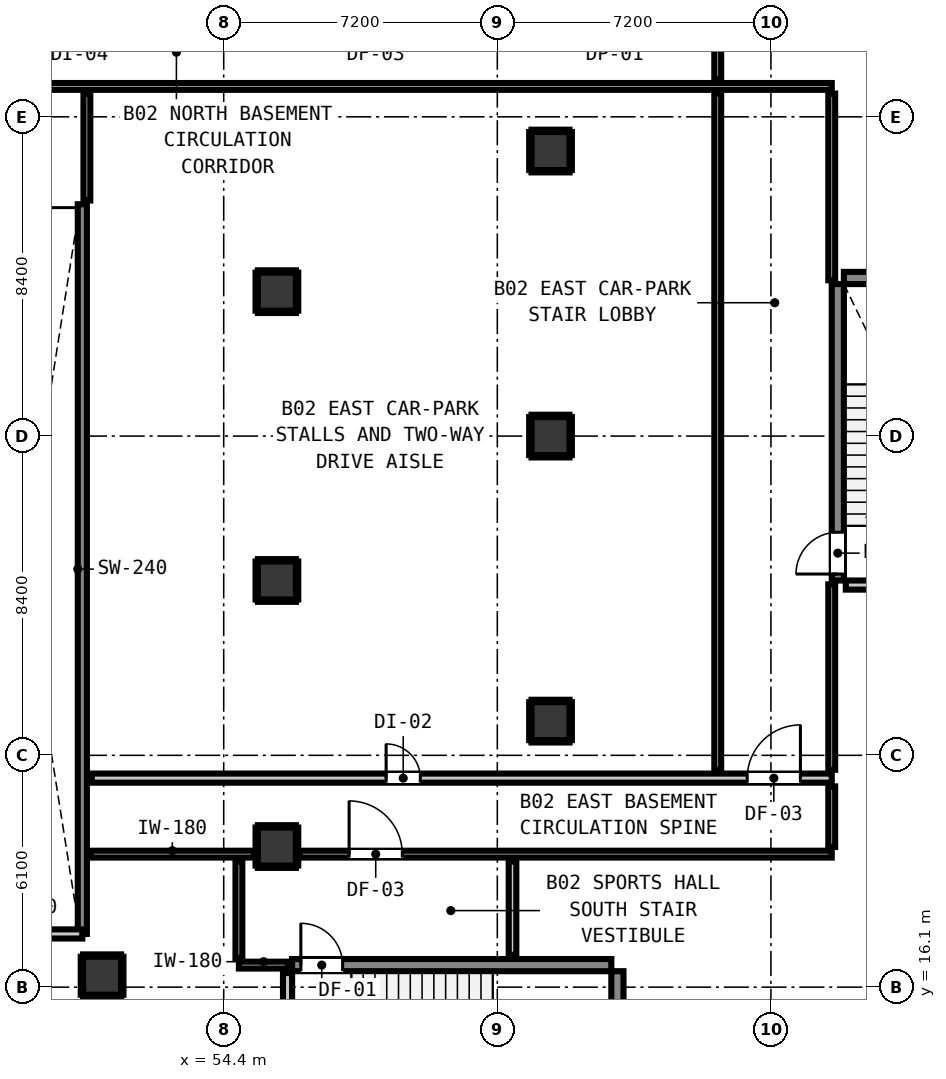
"""IFC4 building model, lengths in metres.
Left out: names, types, materials, properties, quantities, classifications, styles, units other than length and angle.
Written with IfcOpenShell. Run it as: python <this file> out.ifc"""

import sys

from ifc_helpers import new_model, si_unit, direction, frame, frame_2d, origin, origin_2d, place, context, subcontext, project, spatial, rectangle, extrude, element, fill, save


model = new_model("IFC4")
c1 = context("Model", 3, precision=1e-05, world=origin(), true_north=direction((0.0, 1.0)))
c2 = subcontext(c1, "Body", "Model", "MODEL_VIEW")
j1 = project(units=[si_unit("LENGTHUNIT", "METRE"), si_unit("PLANEANGLEUNIT", "RADIAN")], contexts=[c1])
p1 = place(None, origin())
s1 = spatial("IfcSite", under=j1, at=p1, CompositionType="ELEMENT")
p2 = place(p1, origin())
s2 = spatial("IfcBuilding", under=s1, at=p2, CompositionType="ELEMENT")
p3 = place(p2, frame((0.0, 0.0, -8.8)))
s3 = spatial("IfcBuildingStorey", under=s2, at=p3, CompositionType="ELEMENT", Elevation=-8.8)
p4 = place(p3, frame((64.76, 13.2, 0.0), z_axis=(0.0, 0.0, 1.0), x_axis=(0.0, 1.0, 0.0)))
e1 = element("IfcWall", 1, at=p4, inside=s3, PredefinedType="SHEAR", context=c2, shape_type="SweptSolid", body=[
    extrude(rectangle(XDim=3.32, YDim=0.32, at=frame_2d((1.66, 0.0))), origin(), (0.0, 0.0, 1.0), 4.4),
])
p5 = place(p3, frame((56.2, 16.68, 0.0), z_axis=(0.0, 0.0, 1.0), x_axis=(1.0, 0.0, 0.0)))
e2 = element("IfcWall", 2, at=p5, inside=s3, PredefinedType="SHEAR", context=c2, shape_type="SweptSolid", body=[
    extrude(rectangle(XDim=8.4, YDim=0.32, at=frame_2d((4.2, 0.0))), origin(), (0.0, 0.0, 1.0), 4.4),
])
p6 = place(p5, frame((0.23, 0.0, 0.0)))
e3 = element("IfcOpeningElement", 3, at=p6, cuts=e2, PredefinedType="OPENING", context=c2, shape_type="SweptSolid", body=[
    extrude(rectangle(XDim=1.1, YDim=2.15, at=frame_2d((0.55, 1.075))), frame((0.0, 0.17, 0.0), z_axis=(0.0, -1.0, 0.0), x_axis=(1.0, 0.0, 0.0)), (0.0, 0.0, 1.0), 0.34),
])
p7 = place(p3, frame((70.72, 34.76, 0.0), z_axis=(0.0, 0.0, 1.0), x_axis=(1.0, 0.0, 0.0)))
e4 = element("IfcWall", 4, at=p7, inside=s3, PredefinedType="SHEAR", context=c2, shape_type="SweptSolid", body=[
    extrude(rectangle(XDim=3.08, YDim=0.32, at=frame_2d((1.54, 0.0))), origin(), (0.0, 0.0, 1.0), 4.4),
])
p8 = place(p3, frame((70.56, 26.8, 0.0), z_axis=(0.0, 0.0, 1.0), x_axis=(0.0, 1.0, 0.0)))
e5 = element("IfcWall", 5, at=p8, inside=s3, PredefinedType="SHEAR", context=c2, shape_type="SweptSolid", body=[
    extrude(rectangle(XDim=7.8, YDim=0.32, at=frame_2d((3.9, 0.0))), origin(), (0.0, 0.0, 1.0), 4.4),
])
p9 = place(p8, frame((0.17, 0.0, 0.0)))
e6 = element("IfcOpeningElement", 6, at=p9, cuts=e5, PredefinedType="OPENING", context=c2, shape_type="SweptSolid", body=[
    extrude(rectangle(XDim=1.1, YDim=2.15, at=frame_2d((0.55, 1.075))), frame((0.0, 0.17, 0.0), z_axis=(0.0, -1.0, 0.0), x_axis=(1.0, 0.0, 0.0)), (0.0, 0.0, 1.0), 0.34),
])
p10 = place(p3, frame((50.68, 17.5, 0.0), z_axis=(0.0, 0.0, 1.0), x_axis=(0.0, 1.0, 0.0)))
e7 = element("IfcWall", 7, at=p10, inside=s3, PredefinedType="SHEAR", context=c2, shape_type="SweptSolid", body=[
    extrude(rectangle(XDim=19.2, YDim=0.24, at=frame_2d((9.6, 0.0))), origin(), (0.0, 0.0, 1.0), 4.4),
])
for number, where, z_axis, x_axis in (
    (8, (63.0, 23.1, 0.0), (0.0, 0.0, 1.0), (1.0, 0.0, 0.0)),
    (9, (63.0, 30.6, 0.0), (0.0, 0.0, 1.0), (1.0, 0.0, 0.0)),
    (10, (63.0, 38.1, 0.0), (0.0, 0.0, 1.0), (1.0, 0.0, 0.0)),
    (11, (51.2, 16.4, 0.0), (0.0, 0.0, 1.0), (1.0, 0.0, 0.0)),
    (12, (55.8, 19.8, 0.0), (0.0, 0.0, 1.0), (1.0, 0.0, 0.0)),
    (13, (55.8, 26.8, 0.0), (0.0, 0.0, 1.0), (1.0, 0.0, 0.0)),
    (14, (55.8, 34.4, 0.0), (0.0, 0.0, 1.0), (1.0, 0.0, 0.0)),
):
    element("IfcColumn", number, at=place(p3, frame(where, z_axis=z_axis, x_axis=x_axis)), inside=s3, PredefinedType="COLUMN", context=c2, shape_type="SweptSolid", body=[
        extrude(rectangle(XDim=1.0, YDim=1.0, at=origin_2d()), origin(), (0.0, 0.0, 1.0), 4.4),
    ])
p11 = place(p3, frame((47.52, 17.5, 0.0), z_axis=(0.0, 0.0, 1.0), x_axis=(1.0, 0.0, 0.0)))
e15 = element("IfcWall", 15, at=p11, inside=s3, PredefinedType="PARAPET", context=c2, shape_type="SweptSolid", body=[
    extrude(rectangle(XDim=3.16, YDim=0.24, at=frame_2d((1.58, 0.0))), origin(), (0.0, 0.0, 1.0), 1.2),
])
p12 = place(p3, frame((56.08, 14.432, 0.0), z_axis=(0.0, 0.0, 1.0), x_axis=(0.0, 1.0, 0.0)))
e16 = element("IfcWall", 16, at=p12, inside=s3, PredefinedType="PARTITIONING", context=c2, shape_type="SweptSolid", body=[
    extrude(rectangle(XDim=2.038, YDim=0.24, at=frame_2d((1.019, 0.0))), origin(), (0.0, 0.0, 1.0), 4.1),
])
p13 = place(p3, frame((70.77, 26.68, 0.0), z_axis=(0.0, 0.0, 1.0), x_axis=(1.0, 0.0, 0.0)))
e17 = element("IfcWall", 17, at=p13, inside=s3, PredefinedType="PARTITIONING", context=c2, shape_type="SweptSolid", body=[
    extrude(rectangle(XDim=2.98, YDim=0.24, at=frame_2d((1.49, 0.0))), origin(), (0.0, 0.0, 1.0), 4.1),
])
p14 = place(p3, frame((50.928, 21.6, 0.0), z_axis=(0.0, 0.0, 1.0), x_axis=(1.0, 0.0, 0.0)))
e18 = element("IfcWall", 18, at=p14, inside=s3, PredefinedType="PARTITIONING", context=c2, shape_type="SweptSolid", body=[
    extrude(rectangle(XDim=19.472, YDim=0.24, at=frame_2d((9.736, 0.0))), origin(), (0.0, 0.0, 1.0), 4.1),
])
p15 = place(p14, frame((17.248, 0.0, 0.0)))
e19 = element("IfcOpeningElement", 19, at=p15, cuts=e18, PredefinedType="OPENING", context=c2, shape_type="SweptSolid", body=[
    extrude(rectangle(XDim=1.4, YDim=2.15, at=frame_2d((0.7, 1.075))), frame((0.0, 0.13, 0.0), z_axis=(0.0, -1.0, 0.0), x_axis=(1.0, 0.0, 0.0)), (0.0, 0.0, 1.0), 0.26),
])
p16 = place(p14, frame((7.746, 0.0, 0.0)))
e20 = element("IfcOpeningElement", 20, at=p16, cuts=e18, PredefinedType="OPENING", context=c2, shape_type="SweptSolid", body=[
    extrude(rectangle(XDim=0.9, YDim=2.1, at=frame_2d((0.45, 1.05))), frame((0.0, 0.13, 0.0), z_axis=(0.0, -1.0, 0.0), x_axis=(1.0, 0.0, 0.0)), (0.0, 0.0, 1.0), 0.26),
])
p17 = place(p3, frame((54.8, 16.68, 0.0), z_axis=(0.0, 0.0, 1.0), x_axis=(1.0, 0.0, 0.0)))
e21 = element("IfcWall", 21, at=p17, inside=s3, PredefinedType="PARTITIONING", context=c2, shape_type="SweptSolid", body=[
    extrude(rectangle(XDim=1.3, YDim=0.18, at=frame_2d((0.65, 0.0))), origin(), (0.0, 0.0, 1.0), 4.1),
])
p18 = place(p3, frame((50.898, 19.6, 0.0), z_axis=(0.0, 0.0, 1.0), x_axis=(1.0, 0.0, 0.0)))
e22 = element("IfcWall", 22, at=p18, inside=s3, PredefinedType="PARTITIONING", context=c2, shape_type="SweptSolid", body=[
    extrude(rectangle(XDim=4.3, YDim=0.18, at=frame_2d((2.15, 0.0))), origin(), (0.0, 0.0, 1.0), 4.1),
])
p19 = place(p3, frame((56.402, 19.6, 0.0), z_axis=(0.0, 0.0, 1.0), x_axis=(1.0, 0.0, 0.0)))
e23 = element("IfcWall", 23, at=p19, inside=s3, PredefinedType="PARTITIONING", context=c2, shape_type="SweptSolid", body=[
    extrude(rectangle(XDim=13.998, YDim=0.18, at=frame_2d((6.999, 0.0))), origin(), (0.0, 0.0, 1.0), 4.1),
])
p20 = place(p19, frame((1.298, 0.0, 0.0)))
e24 = element("IfcOpeningElement", 24, at=p20, cuts=e23, PredefinedType="OPENING", context=c2, shape_type="SweptSolid", body=[
    extrude(rectangle(XDim=1.4, YDim=2.15, at=frame_2d((0.7, 1.075))), frame((0.0, 0.1, 0.0), z_axis=(0.0, -1.0, 0.0), x_axis=(1.0, 0.0, 0.0)), (0.0, 0.0, 1.0), 0.2),
])
p21 = place(p3, frame((47.302, 39.8, 0.0), z_axis=(0.0, 0.0, 1.0), x_axis=(1.0, 0.0, 0.0)))
e25 = element("IfcWall", 25, at=p21, inside=s3, PredefinedType="PARTITIONING", context=c2, shape_type="SweptSolid", body=[
    extrude(rectangle(XDim=23.098, YDim=0.18, at=frame_2d((11.549, 0.0))), origin(), (0.0, 0.0, 1.0), 4.1),
])
p22 = place(p3, frame((62.0, 16.95, 0.0), z_axis=(0.0, 0.0, 1.0), x_axis=(0.0, 1.0, 0.0)))
e26 = element("IfcWall", 26, at=p22, inside=s3, PredefinedType="PARTITIONING", context=c2, shape_type="SweptSolid", body=[
    extrude(rectangle(XDim=2.452, YDim=0.2, at=frame_2d((1.226, 0.0))), origin(), (0.0, 0.0, 1.0), 4.1),
])
p23 = place(p3, frame((50.8, 36.798, 0.0), z_axis=(0.0, 0.0, 1.0), x_axis=(0.0, 1.0, 0.0)))
e27 = element("IfcWall", 27, at=p23, inside=s3, PredefinedType="PARTITIONING", context=c2, shape_type="SweptSolid", body=[
    extrude(rectangle(XDim=2.814, YDim=0.18, at=frame_2d((1.407, 0.0))), origin(), (0.0, 0.0, 1.0), 4.1),
])
p24 = place(p3, frame((54.8, 16.868, 0.0), z_axis=(0.0, 0.0, 1.0), x_axis=(0.0, 1.0, 0.0)))
e28 = element("IfcWall", 28, at=p24, inside=s3, PredefinedType="PARTITIONING", context=c2, shape_type="SweptSolid", body=[
    extrude(rectangle(XDim=2.544, YDim=0.18, at=frame_2d((1.272, 0.0))), origin(), (0.0, 0.0, 1.0), 4.1),
])
p25 = place(p3, frame((67.4, 21.818, 0.0), z_axis=(0.0, 0.0, 1.0), x_axis=(0.0, 1.0, 0.0)))
e29 = element("IfcWall", 29, at=p25, inside=s3, PredefinedType="PARTITIONING", context=c2, shape_type="SweptSolid", body=[
    extrude(rectangle(XDim=17.794, YDim=0.18, at=frame_2d((8.897, 0.0))), origin(), (0.0, 0.0, 1.0), 4.1),
])
p26 = place(p3, frame((67.4, 39.988, 0.0), z_axis=(0.0, 0.0, 1.0), x_axis=(0.0, 1.0, 0.0)))
e30 = element("IfcWall", 30, at=p26, inside=s3, PredefinedType="PARTITIONING", context=c2, shape_type="SweptSolid", body=[
    extrude(rectangle(XDim=1.414, YDim=0.18, at=frame_2d((0.707, 0.0))), origin(), (0.0, 0.0, 1.0), 4.1),
])
p27 = place(p3, frame((70.4, 19.788, 0.0), z_axis=(0.0, 0.0, 1.0), x_axis=(0.0, 1.0, 0.0)))
e31 = element("IfcWall", 31, at=p27, inside=s3, PredefinedType="PARTITIONING", context=c2, shape_type="SweptSolid", body=[
    extrude(rectangle(XDim=1.594, YDim=0.18, at=frame_2d((0.797, 0.0))), origin(), (0.0, 0.0, 1.0), 4.1),
])
p28 = place(p3, frame((70.4, 21.818, 0.0), z_axis=(0.0, 0.0, 1.0), x_axis=(0.0, 1.0, 0.0)))
e32 = element("IfcWall", 32, at=p28, inside=s3, PredefinedType="PARTITIONING", context=c2, shape_type="SweptSolid", body=[
    extrude(rectangle(XDim=4.882, YDim=0.18, at=frame_2d((2.441, 0.0))), origin(), (0.0, 0.0, 1.0), 4.1),
])
p29 = place(p3, frame((70.4, 34.7, 0.0), z_axis=(0.0, 0.0, 1.0), x_axis=(0.0, 1.0, 0.0)))
e33 = element("IfcWall", 33, at=p29, inside=s3, PredefinedType="PARTITIONING", context=c2, shape_type="SweptSolid", body=[
    extrude(rectangle(XDim=4.912, YDim=0.18, at=frame_2d((2.456, 0.0))), origin(), (0.0, 0.0, 1.0), 4.1),
])
for number, where, z_axis, x_axis in (
    (34, (62.5, 22.568, 0.0), (0.0, 0.0, 1.0), (1.0, 0.0, 0.0)),
    (35, (62.5, 23.632, 0.0), (0.0, 0.0, 1.0), (1.0, 0.0, 0.0)),
    (36, (62.468, 22.6, 0.0), (0.0, 0.0, 1.0), (0.0, 1.0, 0.0)),
    (37, (63.532, 22.6, 0.0), (0.0, 0.0, 1.0), (0.0, 1.0, 0.0)),
    (38, (62.5, 30.068, 0.0), (0.0, 0.0, 1.0), (1.0, 0.0, 0.0)),
    (39, (62.5, 31.132, 0.0), (0.0, 0.0, 1.0), (1.0, 0.0, 0.0)),
    (40, (62.468, 30.1, 0.0), (0.0, 0.0, 1.0), (0.0, 1.0, 0.0)),
    (41, (63.532, 30.1, 0.0), (0.0, 0.0, 1.0), (0.0, 1.0, 0.0)),
    (42, (62.5, 37.568, 0.0), (0.0, 0.0, 1.0), (1.0, 0.0, 0.0)),
    (43, (62.5, 38.632, 0.0), (0.0, 0.0, 1.0), (1.0, 0.0, 0.0)),
    (44, (62.468, 37.6, 0.0), (0.0, 0.0, 1.0), (0.0, 1.0, 0.0)),
    (45, (63.532, 37.6, 0.0), (0.0, 0.0, 1.0), (0.0, 1.0, 0.0)),
    (46, (50.7, 15.868, 0.0), (0.0, 0.0, 1.0), (1.0, 0.0, 0.0)),
    (47, (50.7, 16.932, 0.0), (0.0, 0.0, 1.0), (1.0, 0.0, 0.0)),
    (48, (50.668, 15.9, 0.0), (0.0, 0.0, 1.0), (0.0, 1.0, 0.0)),
    (49, (51.732, 15.9, 0.0), (0.0, 0.0, 1.0), (0.0, 1.0, 0.0)),
    (50, (55.3, 19.268, 0.0), (0.0, 0.0, 1.0), (1.0, 0.0, 0.0)),
    (51, (55.3, 20.332, 0.0), (0.0, 0.0, 1.0), (1.0, 0.0, 0.0)),
    (52, (55.268, 19.3, 0.0), (0.0, 0.0, 1.0), (0.0, 1.0, 0.0)),
    (53, (56.332, 19.3, 0.0), (0.0, 0.0, 1.0), (0.0, 1.0, 0.0)),
    (54, (55.3, 26.268, 0.0), (0.0, 0.0, 1.0), (1.0, 0.0, 0.0)),
    (55, (55.3, 27.332, 0.0), (0.0, 0.0, 1.0), (1.0, 0.0, 0.0)),
    (56, (55.268, 26.3, 0.0), (0.0, 0.0, 1.0), (0.0, 1.0, 0.0)),
    (57, (56.332, 26.3, 0.0), (0.0, 0.0, 1.0), (0.0, 1.0, 0.0)),
    (58, (55.3, 33.868, 0.0), (0.0, 0.0, 1.0), (1.0, 0.0, 0.0)),
    (59, (55.3, 34.932, 0.0), (0.0, 0.0, 1.0), (1.0, 0.0, 0.0)),
    (60, (55.268, 33.9, 0.0), (0.0, 0.0, 1.0), (0.0, 1.0, 0.0)),
    (61, (56.332, 33.9, 0.0), (0.0, 0.0, 1.0), (0.0, 1.0, 0.0)),
):
    element("IfcWall", number, at=place(p3, frame(where, z_axis=z_axis, x_axis=x_axis)), inside=s3, PredefinedType="PARTITIONING", context=c2, shape_type="SweptSolid", body=[
        extrude(rectangle(XDim=1.0, YDim=0.06, at=frame_2d((0.5, 0.0))), origin(), (0.0, 0.0, 1.0), 1.45),
    ])
p30 = place(p6, origin())
e62 = element("IfcDoor", 62, at=p30, inside=s3, OperationType="SINGLE_SWING_LEFT", PredefinedType="DOOR", context=c2, shape_type="SweptSolid", body=[
    extrude(rectangle(XDim=1.1, YDim=2.15, at=frame_2d((0.55, 1.075))), frame((0.0, 0.025, 0.0), z_axis=(0.0, -1.0, 0.0), x_axis=(1.0, 0.0, 0.0)), (0.0, 0.0, 1.0), 0.05),
])
fill(e3, e62)
p31 = place(p9, origin())
e63 = element("IfcDoor", 63, at=p31, inside=s3, OperationType="SINGLE_SWING_LEFT", PredefinedType="DOOR", context=c2, shape_type="SweptSolid", body=[
    extrude(rectangle(XDim=1.1, YDim=2.15, at=frame_2d((0.55, 1.075))), frame((0.0, 0.025, 0.0), z_axis=(0.0, -1.0, 0.0), x_axis=(1.0, 0.0, 0.0)), (0.0, 0.0, 1.0), 0.05),
])
fill(e6, e63)
p32 = place(p15, origin())
e64 = element("IfcDoor", 64, at=p32, inside=s3, OperationType="SINGLE_SWING_RIGHT", PredefinedType="DOOR", context=c2, shape_type="SweptSolid", body=[
    extrude(rectangle(XDim=1.4, YDim=2.15, at=frame_2d((0.7, 1.075))), frame((0.0, 0.025, 0.0), z_axis=(0.0, -1.0, 0.0), x_axis=(1.0, 0.0, 0.0)), (0.0, 0.0, 1.0), 0.05),
])
fill(e19, e64)
p33 = place(p20, origin())
e65 = element("IfcDoor", 65, at=p33, inside=s3, OperationType="SINGLE_SWING_LEFT", PredefinedType="DOOR", context=c2, shape_type="SweptSolid", body=[
    extrude(rectangle(XDim=1.4, YDim=2.15, at=frame_2d((0.7, 1.075))), frame((0.0, 0.025, 0.0), z_axis=(0.0, -1.0, 0.0), x_axis=(1.0, 0.0, 0.0)), (0.0, 0.0, 1.0), 0.05),
])
fill(e24, e65)
p34 = place(p16, origin())
e66 = element("IfcDoor", 66, at=p34, inside=s3, OperationType="SINGLE_SWING_LEFT", PredefinedType="DOOR", context=c2, shape_type="SweptSolid", body=[
    extrude(rectangle(XDim=0.9, YDim=2.1, at=frame_2d((0.45, 1.05))), frame((0.0, 0.025, 0.0), z_axis=(0.0, -1.0, 0.0), x_axis=(1.0, 0.0, 0.0)), (0.0, 0.0, 1.0), 0.05),
])
fill(e20, e66)
save(model, sys.argv[1])
